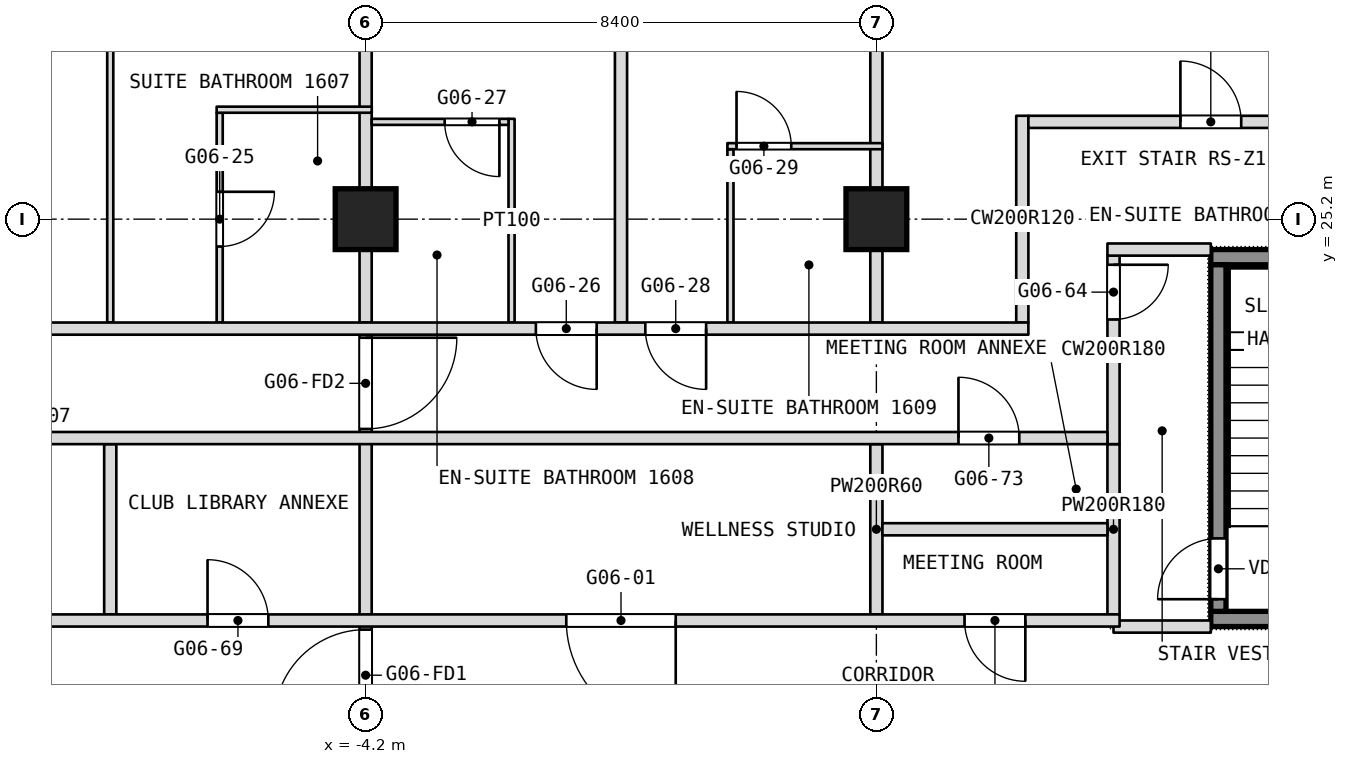
"""IFC4 building model, lengths in metres.
Left out: names, types, materials, properties, quantities, classifications, styles, units other than length and angle.
Written with IfcOpenShell. Run it as: python <this file> out.ifc"""

import sys

from ifc_helpers import new_model, si_unit, direction, frame, frame_2d, origin, origin_2d, place, context, subcontext, project, spatial, rectangle, extrude, element, fill, save


model = new_model("IFC4")
c1 = context("Model", 3, precision=1e-05, world=origin(), true_north=direction((0.0, 1.0)))
c2 = subcontext(c1, "Body", "Model", "MODEL_VIEW")
j1 = project(units=[si_unit("LENGTHUNIT", "METRE"), si_unit("PLANEANGLEUNIT", "RADIAN")], contexts=[c1])
p1 = place(None, origin())
s1 = spatial("IfcSite", under=j1, at=p1, CompositionType="ELEMENT")
p2 = place(p1, origin())
s2 = spatial("IfcBuilding", under=s1, at=p2, CompositionType="ELEMENT")
p3 = place(p2, frame((0.0, 0.0, 72.5)))
s3 = spatial("IfcBuildingStorey", under=s2, at=p3, CompositionType="ELEMENT", Elevation=72.5)
for number, where, z_axis, x_axis in (
    (1, (-4.2, 25.2, 0.0), (0.0, 0.0, 1.0), (1.0, 0.0, 0.0)),
    (2, (4.2, 25.2, 0.0), (0.0, 0.0, 1.0), (1.0, 0.0, 0.0)),
):
    element("IfcColumn", number, at=place(p3, frame(where, z_axis=z_axis, x_axis=x_axis)), inside=s3, PredefinedType="COLUMN", context=c2, shape_type="SweptSolid", body=[
        extrude(rectangle(XDim=1.0, YDim=1.0, at=origin_2d()), origin(), (0.0, 0.0, 1.0), 3.6),
    ])
p4 = place(p3, frame((8.1, 18.7, 0.0), z_axis=(0.0, 0.0, 1.0), x_axis=(0.0, 1.0, 0.0)))
e3 = element("IfcWall", 3, at=p4, inside=s3, PredefinedType="PARTITIONING", context=c2, shape_type="SweptSolid", body=[
    extrude(rectangle(XDim=2.8, YDim=0.2, at=frame_2d((1.4, 0.0))), origin(), (0.0, 0.0, 1.0), 3.34),
])
p5 = place(p3, frame((8.1, 21.5, 0.0), z_axis=(0.0, 0.0, 1.0), x_axis=(0.0, 1.0, 0.0)))
e4 = element("IfcWall", 4, at=p5, inside=s3, PredefinedType="PARTITIONING", context=c2, shape_type="SweptSolid", body=[
    extrude(rectangle(XDim=3.1, YDim=0.2, at=frame_2d((1.55, 0.0))), origin(), (0.0, 0.0, 1.0), 3.34),
])
p6 = place(p5, frame((2.05, 0.0, 0.0)))
e5 = element("IfcOpeningElement", 5, at=p6, cuts=e4, PredefinedType="OPENING", context=c2, shape_type="SweptSolid", body=[
    extrude(rectangle(XDim=0.9, YDim=2.1, at=frame_2d((0.45, 1.05))), frame((0.0, 0.1, 0.0), z_axis=(0.0, -1.0, 0.0), x_axis=(1.0, 0.0, 0.0)), (0.0, 0.0, 1.0), 0.2),
])
p7 = place(p3, frame((6.6, 23.5, 0.0), z_axis=(0.0, 0.0, 1.0), x_axis=(0.0, 1.0, 0.0)))
e6 = element("IfcWall", 6, at=p7, inside=s3, PredefinedType="PARTITIONING", context=c2, shape_type="SweptSolid", body=[
    extrude(rectangle(XDim=3.4, YDim=0.2, at=frame_2d((1.7, 0.0))), origin(), (0.0, 0.0, 1.0), 3.34),
])
p8 = place(p3, frame((4.2, 18.7, 0.0), z_axis=(0.0, 0.0, 1.0), x_axis=(0.0, 1.0, 0.0)))
e7 = element("IfcWall", 7, at=p8, inside=s3, PredefinedType="PARTITIONING", context=c2, shape_type="SweptSolid", body=[
    extrude(rectangle(XDim=2.8, YDim=0.2, at=frame_2d((1.4, 0.0))), origin(), (0.0, 0.0, 1.0), 3.34),
])
p9 = place(p3, frame((4.2, 23.5, 0.0), z_axis=(0.0, 0.0, 1.0), x_axis=(0.0, 1.0, 0.0)))
e8 = element("IfcWall", 8, at=p9, inside=s3, PredefinedType="PARTITIONING", context=c2, shape_type="SweptSolid", body=[
    extrude(rectangle(XDim=10.04, YDim=0.2, at=frame_2d((5.02, 0.0))), origin(), (0.0, 0.0, 1.0), 3.34),
])
p10 = place(p3, frame((1.8, 23.5, 0.0), z_axis=(0.0, 0.0, 1.0), x_axis=(0.0, 1.0, 0.0)))
e9 = element("IfcWall", 9, at=p10, inside=s3, PredefinedType="PARTITIONING", context=c2, shape_type="SweptSolid", body=[
    extrude(rectangle(XDim=2.85, YDim=0.1, at=frame_2d((1.425, 0.0))), origin(), (0.0, 0.0, 1.0), 3.34),
])
p11 = place(p3, frame((0.0, 23.5, 0.0), z_axis=(0.0, 0.0, 1.0), x_axis=(0.0, 1.0, 0.0)))
e10 = element("IfcWall", 10, at=p11, inside=s3, PredefinedType="PARTITIONING", context=c2, shape_type="SweptSolid", body=[
    extrude(rectangle(XDim=10.04, YDim=0.2, at=frame_2d((5.02, 0.0))), origin(), (0.0, 0.0, 1.0), 3.34),
])
p12 = place(p3, frame((-1.8, 23.5, 0.0), z_axis=(0.0, 0.0, 1.0), x_axis=(0.0, 1.0, 0.0)))
e11 = element("IfcWall", 11, at=p12, inside=s3, PredefinedType="PARTITIONING", context=c2, shape_type="SweptSolid", body=[
    extrude(rectangle(XDim=3.35, YDim=0.1, at=frame_2d((1.675, 0.0))), origin(), (0.0, 0.0, 1.0), 3.34),
])
p13 = place(p3, frame((-4.2, 16.8, 0.0), z_axis=(0.0, 0.0, 1.0), x_axis=(0.0, 1.0, 0.0)))
e12 = element("IfcWall", 12, at=p13, inside=s3, PredefinedType="PARTITIONING", context=c2, shape_type="SweptSolid", body=[
    extrude(rectangle(XDim=6.7, YDim=0.2, at=frame_2d((3.35, 0.0))), origin(), (0.0, 0.0, 1.0), 3.34),
])
p14 = place(p13, frame((0.15, 0.0, 0.0)))
e13 = element("IfcOpeningElement", 13, at=p14, cuts=e12, PredefinedType="OPENING", context=c2, shape_type="SweptSolid", body=[
    extrude(rectangle(XDim=1.5, YDim=2.1, at=frame_2d((0.75, 1.05))), frame((0.0, 0.1, 0.0), z_axis=(0.0, -1.0, 0.0), x_axis=(1.0, 0.0, 0.0)), (0.0, 0.0, 1.0), 0.2),
])
p15 = place(p13, frame((4.95, 0.0, 0.0)))
e14 = element("IfcOpeningElement", 14, at=p15, cuts=e12, PredefinedType="OPENING", context=c2, shape_type="SweptSolid", body=[
    extrude(rectangle(XDim=1.5, YDim=2.1, at=frame_2d((0.75, 1.05))), frame((0.0, 0.1, 0.0), z_axis=(0.0, -1.0, 0.0), x_axis=(1.0, 0.0, 0.0)), (0.0, 0.0, 1.0), 0.2),
])
p16 = place(p3, frame((-4.2, 23.5, 0.0), z_axis=(0.0, 0.0, 1.0), x_axis=(0.0, 1.0, 0.0)))
e15 = element("IfcWall", 15, at=p16, inside=s3, PredefinedType="PARTITIONING", context=c2, shape_type="SweptSolid", body=[
    extrude(rectangle(XDim=10.04, YDim=0.2, at=frame_2d((5.02, 0.0))), origin(), (0.0, 0.0, 1.0), 3.34),
])
p17 = place(p3, frame((-6.6, 23.5, 0.0), z_axis=(0.0, 0.0, 1.0), x_axis=(0.0, 1.0, 0.0)))
e16 = element("IfcWall", 16, at=p17, inside=s3, PredefinedType="PARTITIONING", context=c2, shape_type="SweptSolid", body=[
    extrude(rectangle(XDim=3.45, YDim=0.1, at=frame_2d((1.725, 0.0))), origin(), (0.0, 0.0, 1.0), 3.34),
])
p18 = place(p17, frame((1.25, 0.0, 0.0)))
e17 = element("IfcOpeningElement", 17, at=p18, cuts=e16, PredefinedType="OPENING", context=c2, shape_type="SweptSolid", body=[
    extrude(rectangle(XDim=0.9, YDim=2.1, at=frame_2d((0.45, 1.05))), frame((0.0, 0.05, 0.0), z_axis=(0.0, -1.0, 0.0), x_axis=(1.0, 0.0, 0.0)), (0.0, 0.0, 1.0), 0.1),
])
p19 = place(p3, frame((-8.4, 18.7, 0.0), z_axis=(0.0, 0.0, 1.0), x_axis=(0.0, 1.0, 0.0)))
e18 = element("IfcWall", 18, at=p19, inside=s3, PredefinedType="PARTITIONING", context=c2, shape_type="SweptSolid", body=[
    extrude(rectangle(XDim=2.8, YDim=0.2, at=frame_2d((1.4, 0.0))), origin(), (0.0, 0.0, 1.0), 3.34),
])
p20 = place(p3, frame((-8.4, 23.5, 0.0), z_axis=(0.0, 0.0, 1.0), x_axis=(0.0, 1.0, 0.0)))
e19 = element("IfcWall", 19, at=p20, inside=s3, PredefinedType="PARTITIONING", context=c2, shape_type="SweptSolid", body=[
    extrude(rectangle(XDim=10.04, YDim=0.1, at=frame_2d((5.02, 0.0))), origin(), (0.0, 0.0, 1.0), 3.34),
])
p21 = place(p20, frame((5.57, 0.0, 0.0)))
e20 = element("IfcOpeningElement", 20, at=p21, cuts=e19, PredefinedType="OPENING", context=c2, shape_type="SweptSolid", body=[
    extrude(rectangle(XDim=0.9, YDim=2.1, at=frame_2d((0.45, 1.05))), frame((0.0, 0.05, 0.0), z_axis=(0.0, -1.0, 0.0), x_axis=(1.0, 0.0, 0.0)), (0.0, 0.0, 1.0), 0.1),
])
p22 = place(p3, frame((8.1, 18.5, 0.0), z_axis=(0.0, 0.0, 1.0), x_axis=(1.0, 0.0, 0.0)))
e21 = element("IfcWall", 21, at=p22, inside=s3, PredefinedType="PARTITIONING", context=c2, shape_type="SweptSolid", body=[
    extrude(rectangle(XDim=1.6, YDim=0.2, at=frame_2d((0.8, 0.0))), origin(), (0.0, 0.0, 1.0), 3.34),
])
p23 = place(p3, frame((-16.9, 18.6, 0.0), z_axis=(0.0, 0.0, 1.0), x_axis=(1.0, 0.0, 0.0)))
e22 = element("IfcWall", 22, at=p23, inside=s3, PredefinedType="PARTITIONING", context=c2, shape_type="SweptSolid", body=[
    extrude(rectangle(XDim=25.1, YDim=0.2, at=frame_2d((12.55, 0.0))), origin(), (0.0, 0.0, 1.0), 3.34),
])
p24 = place(p23, frame((16.0, 0.0, 0.0)))
e23 = element("IfcOpeningElement", 23, at=p24, cuts=e22, PredefinedType="OPENING", context=c2, shape_type="SweptSolid", body=[
    extrude(rectangle(XDim=1.8, YDim=2.1, at=frame_2d((0.9, 1.05))), frame((0.0, 0.1, 0.0), z_axis=(0.0, -1.0, 0.0), x_axis=(1.0, 0.0, 0.0)), (0.0, 0.0, 1.0), 0.2),
])
p25 = place(p23, frame((5.9, 0.0, 0.0)))
e24 = element("IfcOpeningElement", 24, at=p25, cuts=e22, PredefinedType="OPENING", context=c2, shape_type="SweptSolid", body=[
    extrude(rectangle(XDim=1.0, YDim=2.1, at=frame_2d((0.5, 1.05))), frame((0.0, 0.1, 0.0), z_axis=(0.0, -1.0, 0.0), x_axis=(1.0, 0.0, 0.0)), (0.0, 0.0, 1.0), 0.2),
])
p26 = place(p23, frame((10.1, 0.0, 0.0)))
e25 = element("IfcOpeningElement", 25, at=p26, cuts=e22, PredefinedType="OPENING", context=c2, shape_type="SweptSolid", body=[
    extrude(rectangle(XDim=1.0, YDim=2.1, at=frame_2d((0.5, 1.05))), frame((0.0, 0.1, 0.0), z_axis=(0.0, -1.0, 0.0), x_axis=(1.0, 0.0, 0.0)), (0.0, 0.0, 1.0), 0.2),
])
p27 = place(p23, frame((1.7, 0.0, 0.0)))
e26 = element("IfcOpeningElement", 26, at=p27, cuts=e22, PredefinedType="OPENING", context=c2, shape_type="SweptSolid", body=[
    extrude(rectangle(XDim=1.0, YDim=2.1, at=frame_2d((0.5, 1.05))), frame((0.0, 0.1, 0.0), z_axis=(0.0, -1.0, 0.0), x_axis=(1.0, 0.0, 0.0)), (0.0, 0.0, 1.0), 0.2),
])
p28 = place(p23, frame((22.55, 0.0, 0.0)))
e27 = element("IfcOpeningElement", 27, at=p28, cuts=e22, PredefinedType="OPENING", context=c2, shape_type="SweptSolid", body=[
    extrude(rectangle(XDim=1.0, YDim=2.1, at=frame_2d((0.5, 1.05))), frame((0.0, 0.1, 0.0), z_axis=(0.0, -1.0, 0.0), x_axis=(1.0, 0.0, 0.0)), (0.0, 0.0, 1.0), 0.2),
])
p29 = place(p3, frame((4.3, 20.1, 0.0), z_axis=(0.0, 0.0, 1.0), x_axis=(1.0, 0.0, 0.0)))
e28 = element("IfcWall", 28, at=p29, inside=s3, PredefinedType="PARTITIONING", context=c2, shape_type="SweptSolid", body=[
    extrude(rectangle(XDim=3.7, YDim=0.2, at=frame_2d((1.85, 0.0))), origin(), (0.0, 0.0, 1.0), 3.34),
])
p30 = place(p3, frame((-16.7, 21.6, 0.0), z_axis=(0.0, 0.0, 1.0), x_axis=(1.0, 0.0, 0.0)))
e29 = element("IfcWall", 29, at=p30, inside=s3, PredefinedType="PARTITIONING", context=c2, shape_type="SweptSolid", body=[
    extrude(rectangle(XDim=24.7, YDim=0.2, at=frame_2d((12.35, 0.0))), origin(), (0.0, 0.0, 1.0), 3.34),
])
p31 = place(p30, frame((1.6, 0.0, 0.0)))
e30 = element("IfcOpeningElement", 30, at=p31, cuts=e29, PredefinedType="OPENING", context=c2, shape_type="SweptSolid", body=[
    extrude(rectangle(XDim=1.0, YDim=2.1, at=frame_2d((0.5, 1.05))), frame((0.0, 0.1, 0.0), z_axis=(0.0, -1.0, 0.0), x_axis=(1.0, 0.0, 0.0)), (0.0, 0.0, 1.0), 0.2),
])
p32 = place(p30, frame((22.25, 0.0, 0.0)))
e31 = element("IfcOpeningElement", 31, at=p32, cuts=e29, PredefinedType="OPENING", context=c2, shape_type="SweptSolid", body=[
    extrude(rectangle(XDim=1.0, YDim=2.1, at=frame_2d((0.5, 1.05))), frame((0.0, 0.1, 0.0), z_axis=(0.0, -1.0, 0.0), x_axis=(1.0, 0.0, 0.0)), (0.0, 0.0, 1.0), 0.2),
])
p33 = place(p3, frame((-16.7, 23.4, 0.0), z_axis=(0.0, 0.0, 1.0), x_axis=(1.0, 0.0, 0.0)))
e32 = element("IfcWall", 32, at=p33, inside=s3, PredefinedType="PARTITIONING", context=c2, shape_type="SweptSolid", body=[
    extrude(rectangle(XDim=23.4, YDim=0.2, at=frame_2d((11.7, 0.0))), origin(), (0.0, 0.0, 1.0), 3.34),
])
p34 = place(p33, frame((2.4, 0.0, 0.0)))
e33 = element("IfcOpeningElement", 33, at=p34, cuts=e32, PredefinedType="OPENING", context=c2, shape_type="SweptSolid", body=[
    extrude(rectangle(XDim=0.9, YDim=2.1, at=frame_2d((0.45, 1.05))), frame((0.0, 0.1, 0.0), z_axis=(0.0, -1.0, 0.0), x_axis=(1.0, 0.0, 0.0)), (0.0, 0.0, 1.0), 0.2),
])
p35 = place(p33, frame((5.65, 0.0, 0.0)))
e34 = element("IfcOpeningElement", 34, at=p35, cuts=e32, PredefinedType="OPENING", context=c2, shape_type="SweptSolid", body=[
    extrude(rectangle(XDim=1.1, YDim=2.1, at=frame_2d((0.55, 1.05))), frame((0.0, 0.1, 0.0), z_axis=(0.0, -1.0, 0.0), x_axis=(1.0, 0.0, 0.0)), (0.0, 0.0, 1.0), 0.2),
])
p36 = place(p33, frame((15.3, 0.0, 0.0)))
e35 = element("IfcOpeningElement", 35, at=p36, cuts=e32, PredefinedType="OPENING", context=c2, shape_type="SweptSolid", body=[
    extrude(rectangle(XDim=1.0, YDim=2.1, at=frame_2d((0.5, 1.05))), frame((0.0, 0.1, 0.0), z_axis=(0.0, -1.0, 0.0), x_axis=(1.0, 0.0, 0.0)), (0.0, 0.0, 1.0), 0.2),
])
p37 = place(p33, frame((17.1, 0.0, 0.0)))
e36 = element("IfcOpeningElement", 36, at=p37, cuts=e32, PredefinedType="OPENING", context=c2, shape_type="SweptSolid", body=[
    extrude(rectangle(XDim=1.0, YDim=2.1, at=frame_2d((0.5, 1.05))), frame((0.0, 0.1, 0.0), z_axis=(0.0, -1.0, 0.0), x_axis=(1.0, 0.0, 0.0)), (0.0, 0.0, 1.0), 0.2),
])
p38 = place(p3, frame((8.0, 24.7, 0.0), z_axis=(0.0, 0.0, 1.0), x_axis=(1.0, 0.0, 0.0)))
e37 = element("IfcWall", 37, at=p38, inside=s3, PredefinedType="PARTITIONING", context=c2, shape_type="SweptSolid", body=[
    extrude(rectangle(XDim=1.7, YDim=0.2, at=frame_2d((0.85, 0.0))), origin(), (0.0, 0.0, 1.0), 3.34),
])
p39 = place(p3, frame((1.75, 26.4, 0.0), z_axis=(0.0, 0.0, 1.0), x_axis=(1.0, 0.0, 0.0)))
e38 = element("IfcWall", 38, at=p39, inside=s3, PredefinedType="PARTITIONING", context=c2, shape_type="SweptSolid", body=[
    extrude(rectangle(XDim=2.55, YDim=0.1, at=frame_2d((1.275, 0.0))), origin(), (0.0, 0.0, 1.0), 3.34),
])
p40 = place(p39, frame((0.15, 0.0, 0.0)))
e39 = element("IfcOpeningElement", 39, at=p40, cuts=e38, PredefinedType="OPENING", context=c2, shape_type="SweptSolid", body=[
    extrude(rectangle(XDim=0.9, YDim=2.1, at=frame_2d((0.45, 1.05))), frame((0.0, 0.05, 0.0), z_axis=(0.0, -1.0, 0.0), x_axis=(1.0, 0.0, 0.0)), (0.0, 0.0, 1.0), 0.1),
])
p41 = place(p3, frame((-4.1, 26.8, 0.0), z_axis=(0.0, 0.0, 1.0), x_axis=(1.0, 0.0, 0.0)))
e40 = element("IfcWall", 40, at=p41, inside=s3, PredefinedType="PARTITIONING", context=c2, shape_type="SweptSolid", body=[
    extrude(rectangle(XDim=2.25, YDim=0.1, at=frame_2d((1.125, 0.0))), origin(), (0.0, 0.0, 1.0), 3.34),
])
p42 = place(p41, frame((1.2, 0.0, 0.0)))
e41 = element("IfcOpeningElement", 41, at=p42, cuts=e40, PredefinedType="OPENING", context=c2, shape_type="SweptSolid", body=[
    extrude(rectangle(XDim=0.9, YDim=2.1, at=frame_2d((0.45, 1.05))), frame((0.0, 0.05, 0.0), z_axis=(0.0, -1.0, 0.0), x_axis=(1.0, 0.0, 0.0)), (0.0, 0.0, 1.0), 0.1),
])
p43 = place(p3, frame((6.7, 26.8, 0.0), z_axis=(0.0, 0.0, 1.0), x_axis=(1.0, 0.0, 0.0)))
e42 = element("IfcWall", 42, at=p43, inside=s3, PredefinedType="PARTITIONING", context=c2, shape_type="SweptSolid", body=[
    extrude(rectangle(XDim=8.0, YDim=0.2, at=frame_2d((4.0, 0.0))), origin(), (0.0, 0.0, 1.0), 3.34),
])
p44 = place(p43, frame((2.5, 0.0, 0.0)))
e43 = element("IfcOpeningElement", 43, at=p44, cuts=e42, PredefinedType="OPENING", context=c2, shape_type="SweptSolid", body=[
    extrude(rectangle(XDim=1.0, YDim=2.1, at=frame_2d((0.5, 1.05))), frame((0.0, 0.1, 0.0), z_axis=(0.0, -1.0, 0.0), x_axis=(1.0, 0.0, 0.0)), (0.0, 0.0, 1.0), 0.2),
])
p45 = place(p3, frame((-6.65, 27.0, 0.0), z_axis=(0.0, 0.0, 1.0), x_axis=(1.0, 0.0, 0.0)))
e44 = element("IfcWall", 44, at=p45, inside=s3, PredefinedType="PARTITIONING", context=c2, shape_type="SweptSolid", body=[
    extrude(rectangle(XDim=2.55, YDim=0.1, at=frame_2d((1.275, 0.0))), origin(), (0.0, 0.0, 1.0), 3.34),
])
for number, where, z_axis, x_axis in (
    (45, (9.7, 18.625, 0.1), (0.0, 0.0, 1.0), (1.0, 0.0, 0.0)),
    (46, (9.7, 24.575, 0.1), (0.0, 0.0, 1.0), (1.0, 0.0, 0.0)),
):
    element("IfcWall", number, at=place(p3, frame(where, z_axis=z_axis, x_axis=x_axis)), inside=s3, PredefinedType="SHEAR", context=c2, shape_type="SweptSolid", body=[
        extrude(rectangle(XDim=3.4, YDim=0.25, at=frame_2d((1.7, 0.0))), origin(), (0.0, 0.0, 1.0), 3.6),
    ])
p46 = place(p3, frame((9.825, 18.75, 0.1), z_axis=(0.0, 0.0, 1.0), x_axis=(0.0, 1.0, 0.0)))
e47 = element("IfcWall", 47, at=p46, inside=s3, PredefinedType="SHEAR", context=c2, shape_type="SweptSolid", body=[
    extrude(rectangle(XDim=5.7, YDim=0.25, at=frame_2d((2.85, 0.0))), origin(), (0.0, 0.0, 1.0), 3.6),
])
p47 = place(p46, frame((0.2, 0.0, 0.0)))
e48 = element("IfcOpeningElement", 48, at=p47, cuts=e47, PredefinedType="OPENING", context=c2, shape_type="SweptSolid", body=[
    extrude(rectangle(XDim=1.0, YDim=2.1, at=frame_2d((0.5, 1.05))), frame((0.0, 0.125, 0.0), z_axis=(0.0, -1.0, 0.0), x_axis=(1.0, 0.0, 0.0)), (0.0, 0.0, 1.0), 0.25),
])
p48 = place(p6, origin())
e49 = element("IfcDoor", 49, at=p48, inside=s3, OperationType="SINGLE_SWING_LEFT", PredefinedType="DOOR", context=c2, shape_type="SweptSolid", body=[
    extrude(rectangle(XDim=0.9, YDim=2.1, at=frame_2d((0.45, 1.05))), frame((0.0, 0.025, 0.0), z_axis=(0.0, -1.0, 0.0), x_axis=(1.0, 0.0, 0.0)), (0.0, 0.0, 1.0), 0.05),
])
fill(e5, e49)
p49 = place(p18, origin())
e50 = element("IfcDoor", 50, at=p49, inside=s3, OperationType="SINGLE_SWING_RIGHT", PredefinedType="DOOR", context=c2, shape_type="SweptSolid", body=[
    extrude(rectangle(XDim=0.9, YDim=2.1, at=frame_2d((0.45, 1.05))), frame((0.0, 0.025, 0.0), z_axis=(0.0, -1.0, 0.0), x_axis=(1.0, 0.0, 0.0)), (0.0, 0.0, 1.0), 0.05),
])
fill(e17, e50)
p50 = place(p24, origin())
e51 = element("IfcDoor", 51, at=p50, inside=s3, OperationType="DOUBLE_DOOR_SINGLE_SWING", PredefinedType="DOOR", context=c2, shape_type="SweptSolid", body=[
    extrude(rectangle(XDim=1.8, YDim=2.1, at=frame_2d((0.9, 1.05))), frame((0.0, 0.025, 0.0), z_axis=(0.0, -1.0, 0.0), x_axis=(1.0, 0.0, 0.0)), (0.0, 0.0, 1.0), 0.05),
])
fill(e23, e51)
p51 = place(p26, origin())
e52 = element("IfcDoor", 52, at=p51, inside=s3, OperationType="SINGLE_SWING_LEFT", PredefinedType="DOOR", context=c2, shape_type="SweptSolid", body=[
    extrude(rectangle(XDim=1.0, YDim=2.1, at=frame_2d((0.5, 1.05))), frame((0.0, 0.025, 0.0), z_axis=(0.0, -1.0, 0.0), x_axis=(1.0, 0.0, 0.0)), (0.0, 0.0, 1.0), 0.05),
])
fill(e25, e52)
p52 = place(p28, origin())
e53 = element("IfcDoor", 53, at=p52, inside=s3, OperationType="SINGLE_SWING_RIGHT", PredefinedType="DOOR", context=c2, shape_type="SweptSolid", body=[
    extrude(rectangle(XDim=1.0, YDim=2.1, at=frame_2d((0.5, 1.05))), frame((0.0, 0.025, 0.0), z_axis=(0.0, -1.0, 0.0), x_axis=(1.0, 0.0, 0.0)), (0.0, 0.0, 1.0), 0.05),
])
fill(e27, e53)
p53 = place(p32, origin())
e54 = element("IfcDoor", 54, at=p53, inside=s3, OperationType="SINGLE_SWING_LEFT", PredefinedType="DOOR", context=c2, shape_type="SweptSolid", body=[
    extrude(rectangle(XDim=1.0, YDim=2.1, at=frame_2d((0.5, 1.05))), frame((0.0, 0.025, 0.0), z_axis=(0.0, -1.0, 0.0), x_axis=(1.0, 0.0, 0.0)), (0.0, 0.0, 1.0), 0.05),
])
fill(e31, e54)
p54 = place(p36, origin())
e55 = element("IfcDoor", 55, at=p54, inside=s3, OperationType="SINGLE_SWING_LEFT", PredefinedType="DOOR", context=c2, shape_type="SweptSolid", body=[
    extrude(rectangle(XDim=1.0, YDim=2.1, at=frame_2d((0.5, 1.05))), frame((0.0, 0.025, 0.0), z_axis=(0.0, -1.0, 0.0), x_axis=(1.0, 0.0, 0.0)), (0.0, 0.0, 1.0), 0.05),
])
fill(e35, e55)
p55 = place(p37, origin())
e56 = element("IfcDoor", 56, at=p55, inside=s3, OperationType="SINGLE_SWING_LEFT", PredefinedType="DOOR", context=c2, shape_type="SweptSolid", body=[
    extrude(rectangle(XDim=1.0, YDim=2.1, at=frame_2d((0.5, 1.05))), frame((0.0, 0.025, 0.0), z_axis=(0.0, -1.0, 0.0), x_axis=(1.0, 0.0, 0.0)), (0.0, 0.0, 1.0), 0.05),
])
fill(e36, e56)
p56 = place(p40, origin())
e57 = element("IfcDoor", 57, at=p56, inside=s3, OperationType="SINGLE_SWING_RIGHT", PredefinedType="DOOR", context=c2, shape_type="SweptSolid", body=[
    extrude(rectangle(XDim=0.9, YDim=2.1, at=frame_2d((0.45, 1.05))), frame((0.0, 0.025, 0.0), z_axis=(0.0, -1.0, 0.0), x_axis=(1.0, 0.0, 0.0)), (0.0, 0.0, 1.0), 0.05),
])
fill(e39, e57)
p57 = place(p42, origin())
e58 = element("IfcDoor", 58, at=p57, inside=s3, OperationType="SINGLE_SWING_LEFT", PredefinedType="DOOR", context=c2, shape_type="SweptSolid", body=[
    extrude(rectangle(XDim=0.9, YDim=2.1, at=frame_2d((0.45, 1.05))), frame((0.0, 0.025, 0.0), z_axis=(0.0, -1.0, 0.0), x_axis=(1.0, 0.0, 0.0)), (0.0, 0.0, 1.0), 0.05),
])
fill(e41, e58)
p58 = place(p44, origin())
e59 = element("IfcDoor", 59, at=p58, inside=s3, OperationType="SINGLE_SWING_LEFT", PredefinedType="DOOR", context=c2, shape_type="SweptSolid", body=[
    extrude(rectangle(XDim=1.0, YDim=2.1, at=frame_2d((0.5, 1.05))), frame((0.0, 0.025, 0.0), z_axis=(0.0, -1.0, 0.0), x_axis=(1.0, 0.0, 0.0)), (0.0, 0.0, 1.0), 0.05),
])
fill(e43, e59)
p59 = place(p47, origin())
e60 = element("IfcDoor", 60, at=p59, inside=s3, OperationType="SINGLE_SWING_LEFT", PredefinedType="DOOR", context=c2, shape_type="SweptSolid", body=[
    extrude(rectangle(XDim=1.0, YDim=2.1, at=frame_2d((0.5, 1.05))), frame((0.0, 0.025, 0.0), z_axis=(0.0, -1.0, 0.0), x_axis=(1.0, 0.0, 0.0)), (0.0, 0.0, 1.0), 0.05),
])
fill(e48, e60)
p60 = place(p14, origin())
e61 = element("IfcDoor", 61, at=p60, inside=s3, OperationType="DOUBLE_DOOR_DOUBLE_SWING", PredefinedType="DOOR", context=c2, shape_type="SweptSolid", body=[
    extrude(rectangle(XDim=1.5, YDim=2.1, at=frame_2d((0.75, 1.05))), frame((0.0, 0.025, 0.0), z_axis=(0.0, -1.0, 0.0), x_axis=(1.0, 0.0, 0.0)), (0.0, 0.0, 1.0), 0.05),
])
fill(e13, e61)
p61 = place(p15, origin())
e62 = element("IfcDoor", 62, at=p61, inside=s3, OperationType="DOUBLE_DOOR_DOUBLE_SWING", PredefinedType="DOOR", context=c2, shape_type="SweptSolid", body=[
    extrude(rectangle(XDim=1.5, YDim=2.1, at=frame_2d((0.75, 1.05))), frame((0.0, 0.025, 0.0), z_axis=(0.0, -1.0, 0.0), x_axis=(1.0, 0.0, 0.0)), (0.0, 0.0, 1.0), 0.05),
])
fill(e14, e62)
save(model, sys.argv[1])
